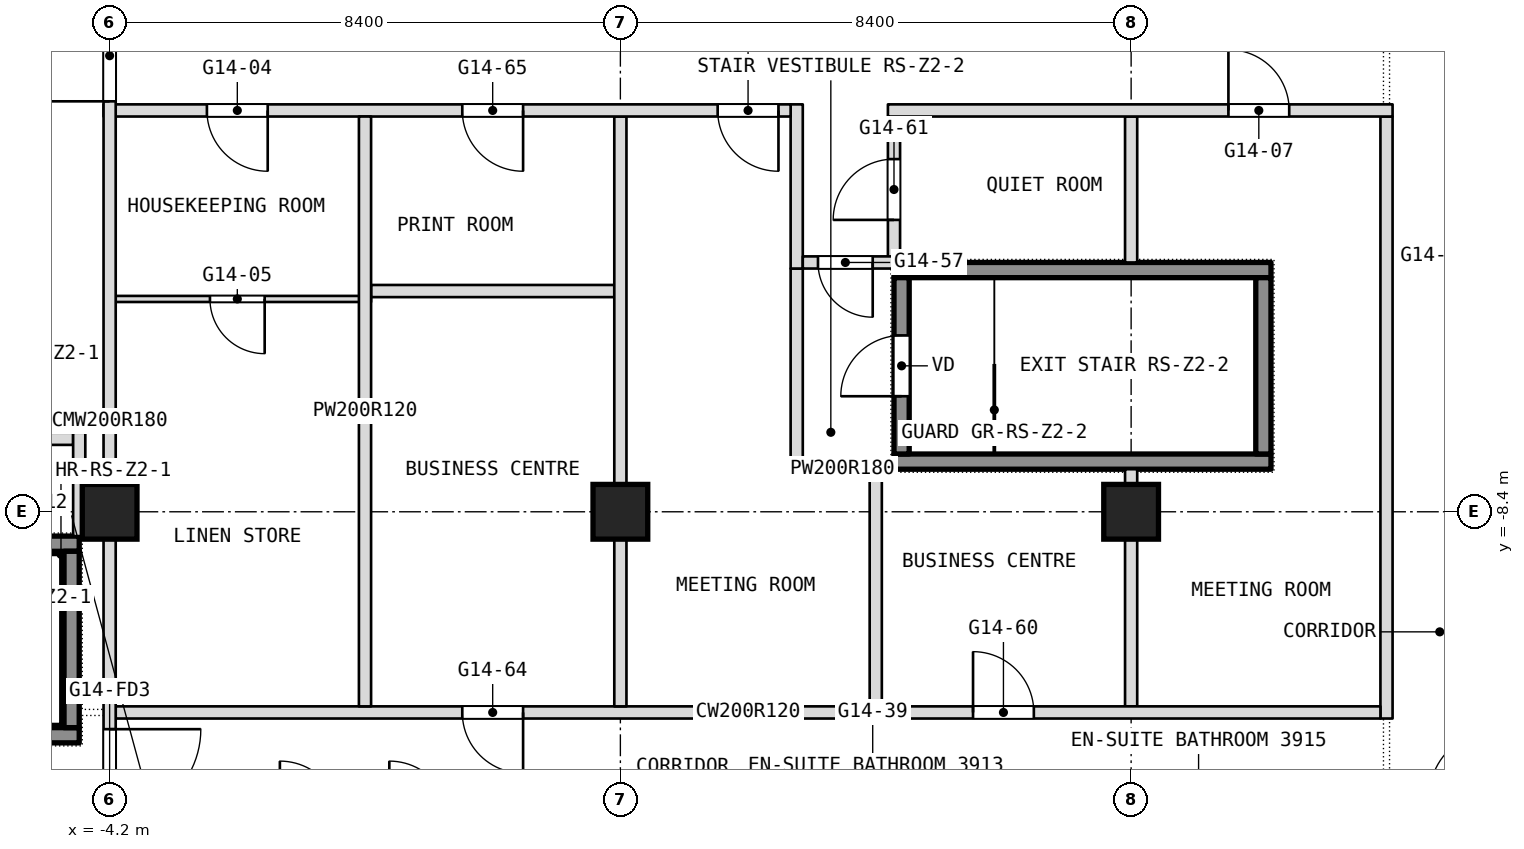
"""IFC4 building model, lengths in metres.
Left out: names, types, materials, properties, quantities, classifications, styles, units other than length and angle.
Written with IfcOpenShell. Run it as: python <this file> out.ifc"""

import sys

from ifc_helpers import new_model, si_unit, direction, frame, frame_2d, origin, origin_2d, place, context, subcontext, project, spatial, rectangle, extrude, element, fill, save


model = new_model("IFC4")
c1 = context("Model", 3, precision=1e-05, world=origin(), true_north=direction((0.0, 1.0)))
c2 = subcontext(c1, "Body", "Model", "MODEL_VIEW")
j1 = project(units=[si_unit("LENGTHUNIT", "METRE"), si_unit("PLANEANGLEUNIT", "RADIAN")], contexts=[c1])
p1 = place(None, origin())
s1 = spatial("IfcSite", under=j1, at=p1, CompositionType="ELEMENT")
p2 = place(p1, origin())
s2 = spatial("IfcBuilding", under=s1, at=p2, CompositionType="ELEMENT")
p3 = place(p2, frame((0.0, 0.0, 166.1)))
s3 = spatial("IfcBuildingStorey", under=s2, at=p3, CompositionType="ELEMENT", Elevation=166.1)
for number, where, z_axis, x_axis in (
    (1, (-4.2, -8.4, 0.0), (0.0, 0.0, 1.0), (1.0, 0.0, 0.0)),
    (2, (4.2, -8.4, 0.0), (0.0, 0.0, 1.0), (1.0, 0.0, 0.0)),
    (3, (12.6, -8.4, 0.0), (0.0, 0.0, 1.0), (1.0, 0.0, 0.0)),
):
    element("IfcColumn", number, at=place(p3, frame(where, z_axis=z_axis, x_axis=x_axis)), inside=s3, PredefinedType="COLUMN", context=c2, shape_type="SweptSolid", body=[
        extrude(rectangle(XDim=0.9, YDim=0.9, at=origin_2d()), origin(), (0.0, 0.0, 1.0), 3.6),
    ])
p4 = place(p3, frame((16.8, -11.8, 0.0), z_axis=(0.0, 0.0, 1.0), x_axis=(0.0, 1.0, 0.0)))
e4 = element("IfcWall", 4, at=p4, inside=s3, PredefinedType="PARTITIONING", context=c2, shape_type="SweptSolid", body=[
    extrude(rectangle(XDim=9.9, YDim=0.2, at=frame_2d((4.95, 0.0))), origin(), (0.0, 0.0, 1.0), 3.3),
])
p5 = place(p3, frame((12.6, -11.6, 0.0), z_axis=(0.0, 0.0, 1.0), x_axis=(0.0, 1.0, 0.0)))
e5 = element("IfcWall", 5, at=p5, inside=s3, PredefinedType="PARTITIONING", context=c2, shape_type="SweptSolid", body=[
    extrude(rectangle(XDim=3.9, YDim=0.2, at=frame_2d((1.95, 0.0))), origin(), (0.0, 0.0, 1.0), 2.486),
])
p6 = place(p3, frame((12.6, -4.3, 0.0), z_axis=(0.0, 0.0, 1.0), x_axis=(0.0, 1.0, 0.0)))
e6 = element("IfcWall", 6, at=p6, inside=s3, PredefinedType="PARTITIONING", context=c2, shape_type="SweptSolid", body=[
    extrude(rectangle(XDim=2.4, YDim=0.2, at=frame_2d((1.2, 0.0))), origin(), (0.0, 0.0, 1.0), 2.486),
])
p7 = place(p3, frame((-4.1, -11.7, 0.0), z_axis=(0.0, 0.0, 1.0), x_axis=(1.0, 0.0, 0.0)))
e7 = element("IfcWall", 7, at=p7, inside=s3, PredefinedType="PARTITIONING", context=c2, shape_type="SweptSolid", body=[
    extrude(rectangle(XDim=20.8, YDim=0.2, at=frame_2d((10.4, 0.0))), origin(), (0.0, 0.0, 1.0), 3.3),
])
p8 = place(p7, frame((14.1, 0.0, 0.0)))
e8 = element("IfcOpeningElement", 8, at=p8, cuts=e7, PredefinedType="OPENING", context=c2, shape_type="SweptSolid", body=[
    extrude(rectangle(XDim=1.0, YDim=2.1, at=frame_2d((0.5, 1.05))), frame((0.0, 0.1, 0.0), z_axis=(0.0, -1.0, 0.0), x_axis=(1.0, 0.0, 0.0)), (0.0, 0.0, 1.0), 0.2),
])
p9 = place(p7, frame((5.7, 0.0, 0.0)))
e9 = element("IfcOpeningElement", 9, at=p9, cuts=e7, PredefinedType="OPENING", context=c2, shape_type="SweptSolid", body=[
    extrude(rectangle(XDim=1.0, YDim=2.1, at=frame_2d((0.5, 1.05))), frame((0.0, 0.1, 0.0), z_axis=(0.0, -1.0, 0.0), x_axis=(1.0, 0.0, 0.0)), (0.0, 0.0, 1.0), 0.2),
])
p10 = place(p3, frame((8.7, -4.3, 0.0), z_axis=(0.0, 0.0, 1.0), x_axis=(0.0, 1.0, 0.0)))
e10 = element("IfcWall", 10, at=p10, inside=s3, PredefinedType="PARTITIONING", context=c2, shape_type="SweptSolid", body=[
    extrude(rectangle(XDim=2.4, YDim=0.2, at=frame_2d((1.2, 0.0))), origin(), (0.0, 0.0, 1.0), 3.3),
])
p11 = place(p10, frame((0.7, 0.0, 0.0)))
e11 = element("IfcOpeningElement", 11, at=p11, cuts=e10, PredefinedType="OPENING", context=c2, shape_type="SweptSolid", body=[
    extrude(rectangle(XDim=1.0, YDim=2.1, at=frame_2d((0.5, 1.05))), frame((0.0, 0.1, 0.0), z_axis=(0.0, -1.0, 0.0), x_axis=(1.0, 0.0, 0.0)), (0.0, 0.0, 1.0), 0.2),
])
p12 = place(p3, frame((8.4, -11.6, 0.0), z_axis=(0.0, 0.0, 1.0), x_axis=(0.0, 1.0, 0.0)))
e12 = element("IfcWall", 12, at=p12, inside=s3, PredefinedType="PARTITIONING", context=c2, shape_type="SweptSolid", body=[
    extrude(rectangle(XDim=3.8, YDim=0.2, at=frame_2d((1.9, 0.0))), origin(), (0.0, 0.0, 1.0), 3.3),
])
p13 = place(p3, frame((7.2, -7.7, 0.0), z_axis=(0.0, 0.0, 1.0), x_axis=(1.0, 0.0, 0.0)))
e13 = element("IfcWall", 13, at=p13, inside=s3, PredefinedType="PARTITIONING", context=c2, shape_type="SweptSolid", body=[
    extrude(rectangle(XDim=1.3, YDim=0.2, at=frame_2d((0.65, 0.0))), origin(), (0.0, 0.0, 1.0), 3.3),
])
p14 = place(p3, frame((-8.5, -7.2, 0.0), z_axis=(0.0, 0.0, 1.0), x_axis=(1.0, 0.0, 0.0)))
e14 = element("IfcWall", 14, at=p14, inside=s3, PredefinedType="PARTITIONING", context=c2, shape_type="SweptSolid", body=[
    extrude(rectangle(XDim=3.7, YDim=0.2, at=frame_2d((1.85, 0.0))), origin(), (0.0, 0.0, 1.0), 3.3),
])
p15 = place(p14, frame((0.25, 0.0, 0.0)))
e15 = element("IfcOpeningElement", 15, at=p15, cuts=e14, PredefinedType="OPENING", context=c2, shape_type="SweptSolid", body=[
    extrude(rectangle(XDim=0.9, YDim=2.1, at=frame_2d((0.45, 1.05))), frame((0.0, 0.1, 0.0), z_axis=(0.0, -1.0, 0.0), x_axis=(1.0, 0.0, 0.0)), (0.0, 0.0, 1.0), 0.2),
])
p16 = place(p3, frame((7.1, -7.8, 0.0), z_axis=(0.0, 0.0, 1.0), x_axis=(0.0, 1.0, 0.0)))
e16 = element("IfcWall", 16, at=p16, inside=s3, PredefinedType="PARTITIONING", context=c2, shape_type="SweptSolid", body=[
    extrude(rectangle(XDim=3.4, YDim=0.2, at=frame_2d((1.7, 0.0))), origin(), (0.0, 0.0, 1.0), 3.3),
])
p17 = place(p3, frame((7.1, -4.4, 0.0), z_axis=(0.0, 0.0, 1.0), x_axis=(0.0, 1.0, 0.0)))
e17 = element("IfcWall", 17, at=p17, inside=s3, PredefinedType="PARTITIONING", context=c2, shape_type="SweptSolid", body=[
    extrude(rectangle(XDim=2.7, YDim=0.2, at=frame_2d((1.35, 0.0))), origin(), (0.0, 0.0, 1.0), 3.3),
])
p18 = place(p3, frame((-4.1, -4.9, 0.0), z_axis=(0.0, 0.0, 1.0), x_axis=(1.0, 0.0, 0.0)))
e18 = element("IfcWall", 18, at=p18, inside=s3, PredefinedType="PARTITIONING", context=c2, shape_type="SweptSolid", body=[
    extrude(rectangle(XDim=4.2, YDim=0.1, at=frame_2d((2.1, 0.0))), origin(), (0.0, 0.0, 1.0), 3.3),
])
p19 = place(p18, frame((1.55, 0.0, 0.0)))
e19 = element("IfcOpeningElement", 19, at=p19, cuts=e18, PredefinedType="OPENING", context=c2, shape_type="SweptSolid", body=[
    extrude(rectangle(XDim=0.9, YDim=2.1, at=frame_2d((0.45, 1.05))), frame((0.0, 0.05, 0.0), z_axis=(0.0, -1.0, 0.0), x_axis=(1.0, 0.0, 0.0)), (0.0, 0.0, 1.0), 0.1),
])
p20 = place(p3, frame((0.1, -4.77, 0.0), z_axis=(0.0, 0.0, 1.0), x_axis=(1.0, 0.0, 0.0)))
e20 = element("IfcWall", 20, at=p20, inside=s3, PredefinedType="PARTITIONING", context=c2, shape_type="SweptSolid", body=[
    extrude(rectangle(XDim=4.0, YDim=0.2, at=frame_2d((2.0, 0.0))), origin(), (0.0, 0.0, 1.0), 3.3),
])
p21 = place(p3, frame((7.2, -4.3, 0.0), z_axis=(0.0, 0.0, 1.0), x_axis=(1.0, 0.0, 0.0)))
e21 = element("IfcWall", 21, at=p21, inside=s3, PredefinedType="PARTITIONING", context=c2, shape_type="SweptSolid", body=[
    extrude(rectangle(XDim=1.5, YDim=0.2, at=frame_2d((0.75, 0.0))), origin(), (0.0, 0.0, 1.0), 3.3),
])
p22 = place(p21, frame((0.25, 0.0, 0.0)))
e22 = element("IfcOpeningElement", 22, at=p22, cuts=e21, PredefinedType="OPENING", context=c2, shape_type="SweptSolid", body=[
    extrude(rectangle(XDim=0.9, YDim=2.1, at=frame_2d((0.45, 1.05))), frame((0.0, 0.1, 0.0), z_axis=(0.0, -1.0, 0.0), x_axis=(1.0, 0.0, 0.0)), (0.0, 0.0, 1.0), 0.2),
])
p23 = place(p3, frame((4.2, -11.6, 0.0), z_axis=(0.0, 0.0, 1.0), x_axis=(0.0, 1.0, 0.0)))
e23 = element("IfcWall", 23, at=p23, inside=s3, PredefinedType="PARTITIONING", context=c2, shape_type="SweptSolid", body=[
    extrude(rectangle(XDim=9.7, YDim=0.2, at=frame_2d((4.85, 0.0))), origin(), (0.0, 0.0, 1.0), 2.486),
])
p24 = place(p3, frame((-4.3, -1.8, 0.0), z_axis=(0.0, 0.0, 1.0), x_axis=(1.0, 0.0, 0.0)))
e24 = element("IfcWall", 24, at=p24, inside=s3, PredefinedType="PARTITIONING", context=c2, shape_type="SweptSolid", body=[
    extrude(rectangle(XDim=11.3, YDim=0.2, at=frame_2d((5.65, 0.0))), origin(), (0.0, 0.0, 1.0), 3.3),
])
p25 = place(p24, frame((1.7, 0.0, 0.0)))
e25 = element("IfcOpeningElement", 25, at=p25, cuts=e24, PredefinedType="OPENING", context=c2, shape_type="SweptSolid", body=[
    extrude(rectangle(XDim=1.0, YDim=2.1, at=frame_2d((0.5, 1.05))), frame((0.0, 0.1, 0.0), z_axis=(0.0, -1.0, 0.0), x_axis=(1.0, 0.0, 0.0)), (0.0, 0.0, 1.0), 0.2),
])
p26 = place(p24, frame((10.1, 0.0, 0.0)))
e26 = element("IfcOpeningElement", 26, at=p26, cuts=e24, PredefinedType="OPENING", context=c2, shape_type="SweptSolid", body=[
    extrude(rectangle(XDim=1.0, YDim=2.1, at=frame_2d((0.5, 1.05))), frame((0.0, 0.1, 0.0), z_axis=(0.0, -1.0, 0.0), x_axis=(1.0, 0.0, 0.0)), (0.0, 0.0, 1.0), 0.2),
])
p27 = place(p24, frame((5.9, 0.0, 0.0)))
e27 = element("IfcOpeningElement", 27, at=p27, cuts=e24, PredefinedType="OPENING", context=c2, shape_type="SweptSolid", body=[
    extrude(rectangle(XDim=1.0, YDim=2.1, at=frame_2d((0.5, 1.05))), frame((0.0, 0.1, 0.0), z_axis=(0.0, -1.0, 0.0), x_axis=(1.0, 0.0, 0.0)), (0.0, 0.0, 1.0), 0.2),
])
p28 = place(p3, frame((8.6, -1.8, 0.0), z_axis=(0.0, 0.0, 1.0), x_axis=(1.0, 0.0, 0.0)))
e28 = element("IfcWall", 28, at=p28, inside=s3, PredefinedType="PARTITIONING", context=c2, shape_type="SweptSolid", body=[
    extrude(rectangle(XDim=8.3, YDim=0.2, at=frame_2d((4.15, 0.0))), origin(), (0.0, 0.0, 1.0), 3.3),
])
p29 = place(p28, frame((5.6, 0.0, 0.0)))
e29 = element("IfcOpeningElement", 29, at=p29, cuts=e28, PredefinedType="OPENING", context=c2, shape_type="SweptSolid", body=[
    extrude(rectangle(XDim=1.0, YDim=2.1, at=frame_2d((0.5, 1.05))), frame((0.0, 0.1, 0.0), z_axis=(0.0, -1.0, 0.0), x_axis=(1.0, 0.0, 0.0)), (0.0, 0.0, 1.0), 0.2),
])
p30 = place(p3, frame((0.0, -11.6, 0.0), z_axis=(0.0, 0.0, 1.0), x_axis=(0.0, 1.0, 0.0)))
e30 = element("IfcWall", 30, at=p30, inside=s3, PredefinedType="PARTITIONING", context=c2, shape_type="SweptSolid", body=[
    extrude(rectangle(XDim=9.7, YDim=0.2, at=frame_2d((4.85, 0.0))), origin(), (0.0, 0.0, 1.0), 3.3),
])
p31 = place(p3, frame((-4.2, -13.8, 0.0), z_axis=(0.0, 0.0, 1.0), x_axis=(0.0, 1.0, 0.0)))
e31 = element("IfcWall", 31, at=p31, inside=s3, PredefinedType="PARTITIONING", context=c2, shape_type="SweptSolid", body=[
    extrude(rectangle(XDim=13.8, YDim=0.2, at=frame_2d((6.9, 0.0))), origin(), (0.0, 0.0, 1.0), 2.486),
])
p32 = place(p31, frame((12.15, 0.0, 0.0)))
e32 = element("IfcOpeningElement", 32, at=p32, cuts=e31, PredefinedType="OPENING", context=c2, shape_type="SweptSolid", body=[
    extrude(rectangle(XDim=1.5, YDim=2.1, at=frame_2d((0.75, 1.05))), frame((0.0, 0.1, 0.0), z_axis=(0.0, -1.0, 0.0), x_axis=(1.0, 0.0, 0.0)), (0.0, 0.0, 1.0), 0.2),
])
p33 = place(p31, frame((0.325, 0.0, 0.0)))
e33 = element("IfcOpeningElement", 33, at=p33, cuts=e31, PredefinedType="OPENING", context=c2, shape_type="SweptSolid", body=[
    extrude(rectangle(XDim=1.5, YDim=2.1, at=frame_2d((0.75, 1.05))), frame((0.0, 0.1, 0.0), z_axis=(0.0, -1.0, 0.0), x_axis=(1.0, 0.0, 0.0)), (0.0, 0.0, 1.0), 0.2),
])
p34 = place(p3, frame((-4.7, -8.8, 0.0), z_axis=(0.0, 0.0, 1.0), x_axis=(0.0, 1.0, 0.0)))
e34 = element("IfcWall", 34, at=p34, inside=s3, PredefinedType="PARTITIONING", context=c2, shape_type="SweptSolid", body=[
    extrude(rectangle(XDim=1.7, YDim=0.2, at=frame_2d((0.85, 0.0))), origin(), (0.0, 0.0, 1.0), 3.3),
])
p35 = place(p3, frame((-10.9, -12.075, 0.1), z_axis=(0.0, 0.0, 1.0), x_axis=(1.0, 0.0, 0.0)))
e35 = element("IfcWall", 35, at=p35, inside=s3, PredefinedType="SHEAR", context=c2, shape_type="SweptSolid", body=[
    extrude(rectangle(XDim=6.2, YDim=0.25, at=frame_2d((3.1, 0.0))), origin(), (0.0, 0.0, 1.0), 3.6),
])
p36 = place(p3, frame((-10.9, -8.925, 0.1), z_axis=(0.0, 0.0, 1.0), x_axis=(1.0, 0.0, 0.0)))
e36 = element("IfcWall", 36, at=p36, inside=s3, PredefinedType="SHEAR", context=c2, shape_type="SweptSolid", body=[
    extrude(rectangle(XDim=6.2, YDim=0.25, at=frame_2d((3.1, 0.0))), origin(), (0.0, 0.0, 1.0), 3.6),
])
p37 = place(p36, frame((0.45, 0.0, 0.0)))
e37 = element("IfcOpeningElement", 37, at=p37, cuts=e36, PredefinedType="OPENING", context=c2, shape_type="SweptSolid", body=[
    extrude(rectangle(XDim=1.0, YDim=2.1, at=frame_2d((0.5, 1.05))), frame((0.0, 0.125, 0.0), z_axis=(0.0, -1.0, 0.0), x_axis=(1.0, 0.0, 0.0)), (0.0, 0.0, 1.0), 0.25),
])
p38 = place(p3, frame((-4.825, -11.95, 0.1), z_axis=(0.0, 0.0, 1.0), x_axis=(0.0, 1.0, 0.0)))
e38 = element("IfcWall", 38, at=p38, inside=s3, PredefinedType="SHEAR", context=c2, shape_type="SweptSolid", body=[
    extrude(rectangle(XDim=2.9, YDim=0.25, at=frame_2d((1.45, 0.0))), origin(), (0.0, 0.0, 1.0), 3.6),
])
for number, where, z_axis, x_axis in (
    (39, (8.7, -7.575, 0.1), (0.0, 0.0, 1.0), (1.0, 0.0, 0.0)),
    (40, (8.7, -4.425, 0.1), (0.0, 0.0, 1.0), (1.0, 0.0, 0.0)),
):
    element("IfcWall", number, at=place(p3, frame(where, z_axis=z_axis, x_axis=x_axis)), inside=s3, PredefinedType="SHEAR", context=c2, shape_type="SweptSolid", body=[
        extrude(rectangle(XDim=6.2, YDim=0.25, at=frame_2d((3.1, 0.0))), origin(), (0.0, 0.0, 1.0), 3.2),
    ])
p39 = place(p3, frame((8.825, -7.45, 0.1), z_axis=(0.0, 0.0, 1.0), x_axis=(0.0, 1.0, 0.0)))
e41 = element("IfcWall", 41, at=p39, inside=s3, PredefinedType="SHEAR", context=c2, shape_type="SweptSolid", body=[
    extrude(rectangle(XDim=2.9, YDim=0.25, at=frame_2d((1.45, 0.0))), origin(), (0.0, 0.0, 1.0), 3.2),
])
p40 = place(p39, frame((0.95, 0.0, 0.0)))
e42 = element("IfcOpeningElement", 42, at=p40, cuts=e41, PredefinedType="OPENING", context=c2, shape_type="SweptSolid", body=[
    extrude(rectangle(XDim=1.0, YDim=2.1, at=frame_2d((0.5, 1.05))), frame((0.0, 0.125, 0.0), z_axis=(0.0, -1.0, 0.0), x_axis=(1.0, 0.0, 0.0)), (0.0, 0.0, 1.0), 0.25),
])
p41 = place(p3, frame((14.775, -7.45, 0.1), z_axis=(0.0, 0.0, 1.0), x_axis=(0.0, 1.0, 0.0)))
e43 = element("IfcWall", 43, at=p41, inside=s3, PredefinedType="SHEAR", context=c2, shape_type="SweptSolid", body=[
    extrude(rectangle(XDim=2.9, YDim=0.25, at=frame_2d((1.45, 0.0))), origin(), (0.0, 0.0, 1.0), 3.2),
])
p42 = place(p8, origin())
e44 = element("IfcDoor", 44, at=p42, inside=s3, OperationType="SINGLE_SWING_RIGHT", PredefinedType="DOOR", context=c2, shape_type="SweptSolid", body=[
    extrude(rectangle(XDim=1.0, YDim=2.1, at=frame_2d((0.5, 1.05))), frame((0.0, 0.025, 0.0), z_axis=(0.0, -1.0, 0.0), x_axis=(1.0, 0.0, 0.0)), (0.0, 0.0, 1.0), 0.05),
])
fill(e8, e44)
p43 = place(p9, origin())
e45 = element("IfcDoor", 45, at=p43, inside=s3, OperationType="SINGLE_SWING_RIGHT", PredefinedType="DOOR", context=c2, shape_type="SweptSolid", body=[
    extrude(rectangle(XDim=1.0, YDim=2.1, at=frame_2d((0.5, 1.05))), frame((0.0, 0.025, 0.0), z_axis=(0.0, -1.0, 0.0), x_axis=(1.0, 0.0, 0.0)), (0.0, 0.0, 1.0), 0.05),
])
fill(e9, e45)
p44 = place(p11, origin())
e46 = element("IfcDoor", 46, at=p44, inside=s3, OperationType="SINGLE_SWING_LEFT", PredefinedType="DOOR", context=c2, shape_type="SweptSolid", body=[
    extrude(rectangle(XDim=1.0, YDim=2.1, at=frame_2d((0.5, 1.05))), frame((0.0, 0.025, 0.0), z_axis=(0.0, -1.0, 0.0), x_axis=(1.0, 0.0, 0.0)), (0.0, 0.0, 1.0), 0.05),
])
fill(e11, e46)
p45 = place(p19, origin())
e47 = element("IfcDoor", 47, at=p45, inside=s3, OperationType="SINGLE_SWING_LEFT", PredefinedType="DOOR", context=c2, shape_type="SweptSolid", body=[
    extrude(rectangle(XDim=0.9, YDim=2.1, at=frame_2d((0.45, 1.05))), frame((0.0, 0.025, 0.0), z_axis=(0.0, -1.0, 0.0), x_axis=(1.0, 0.0, 0.0)), (0.0, 0.0, 1.0), 0.05),
])
fill(e19, e47)
p46 = place(p22, origin())
e48 = element("IfcDoor", 48, at=p46, inside=s3, OperationType="SINGLE_SWING_LEFT", PredefinedType="DOOR", context=c2, shape_type="SweptSolid", body=[
    extrude(rectangle(XDim=0.9, YDim=2.1, at=frame_2d((0.45, 1.05))), frame((0.0, 0.025, 0.0), z_axis=(0.0, -1.0, 0.0), x_axis=(1.0, 0.0, 0.0)), (0.0, 0.0, 1.0), 0.05),
])
fill(e22, e48)
p47 = place(p25, origin())
e49 = element("IfcDoor", 49, at=p47, inside=s3, OperationType="SINGLE_SWING_RIGHT", PredefinedType="DOOR", context=c2, shape_type="SweptSolid", body=[
    extrude(rectangle(XDim=1.0, YDim=2.1, at=frame_2d((0.5, 1.05))), frame((0.0, 0.025, 0.0), z_axis=(0.0, -1.0, 0.0), x_axis=(1.0, 0.0, 0.0)), (0.0, 0.0, 1.0), 0.05),
])
fill(e25, e49)
p48 = place(p26, origin())
e50 = element("IfcDoor", 50, at=p48, inside=s3, OperationType="SINGLE_SWING_LEFT", PredefinedType="DOOR", context=c2, shape_type="SweptSolid", body=[
    extrude(rectangle(XDim=1.0, YDim=2.1, at=frame_2d((0.5, 1.05))), frame((0.0, 0.025, 0.0), z_axis=(0.0, -1.0, 0.0), x_axis=(1.0, 0.0, 0.0)), (0.0, 0.0, 1.0), 0.05),
])
fill(e26, e50)
p49 = place(p27, origin())
e51 = element("IfcDoor", 51, at=p49, inside=s3, OperationType="SINGLE_SWING_LEFT", PredefinedType="DOOR", context=c2, shape_type="SweptSolid", body=[
    extrude(rectangle(XDim=1.0, YDim=2.1, at=frame_2d((0.5, 1.05))), frame((0.0, 0.025, 0.0), z_axis=(0.0, -1.0, 0.0), x_axis=(1.0, 0.0, 0.0)), (0.0, 0.0, 1.0), 0.05),
])
fill(e27, e51)
p50 = place(p29, origin())
e52 = element("IfcDoor", 52, at=p50, inside=s3, OperationType="SINGLE_SWING_LEFT", PredefinedType="DOOR", context=c2, shape_type="SweptSolid", body=[
    extrude(rectangle(XDim=1.0, YDim=2.1, at=frame_2d((0.5, 1.05))), frame((0.0, 0.025, 0.0), z_axis=(0.0, -1.0, 0.0), x_axis=(1.0, 0.0, 0.0)), (0.0, 0.0, 1.0), 0.05),
])
fill(e29, e52)
p51 = place(p40, origin())
e53 = element("IfcDoor", 53, at=p51, inside=s3, OperationType="SINGLE_SWING_LEFT", PredefinedType="DOOR", context=c2, shape_type="SweptSolid", body=[
    extrude(rectangle(XDim=1.0, YDim=2.1, at=frame_2d((0.5, 1.05))), frame((0.0, 0.025, 0.0), z_axis=(0.0, -1.0, 0.0), x_axis=(1.0, 0.0, 0.0)), (0.0, 0.0, 1.0), 0.05),
])
fill(e42, e53)
p52 = place(p32, origin())
e54 = element("IfcDoor", 54, at=p52, inside=s3, OperationType="DOUBLE_DOOR_DOUBLE_SWING", PredefinedType="DOOR", context=c2, shape_type="SweptSolid", body=[
    extrude(rectangle(XDim=1.5, YDim=2.1, at=frame_2d((0.75, 1.05))), frame((0.0, 0.025, 0.0), z_axis=(0.0, -1.0, 0.0), x_axis=(1.0, 0.0, 0.0)), (0.0, 0.0, 1.0), 0.05),
])
fill(e32, e54)
p53 = place(p33, origin())
e55 = element("IfcDoor", 55, at=p53, inside=s3, OperationType="DOUBLE_DOOR_DOUBLE_SWING", PredefinedType="DOOR", context=c2, shape_type="SweptSolid", body=[
    extrude(rectangle(XDim=1.5, YDim=2.1, at=frame_2d((0.75, 1.05))), frame((0.0, 0.025, 0.0), z_axis=(0.0, -1.0, 0.0), x_axis=(1.0, 0.0, 0.0)), (0.0, 0.0, 1.0), 0.05),
])
fill(e33, e55)
save(model, sys.argv[1])
